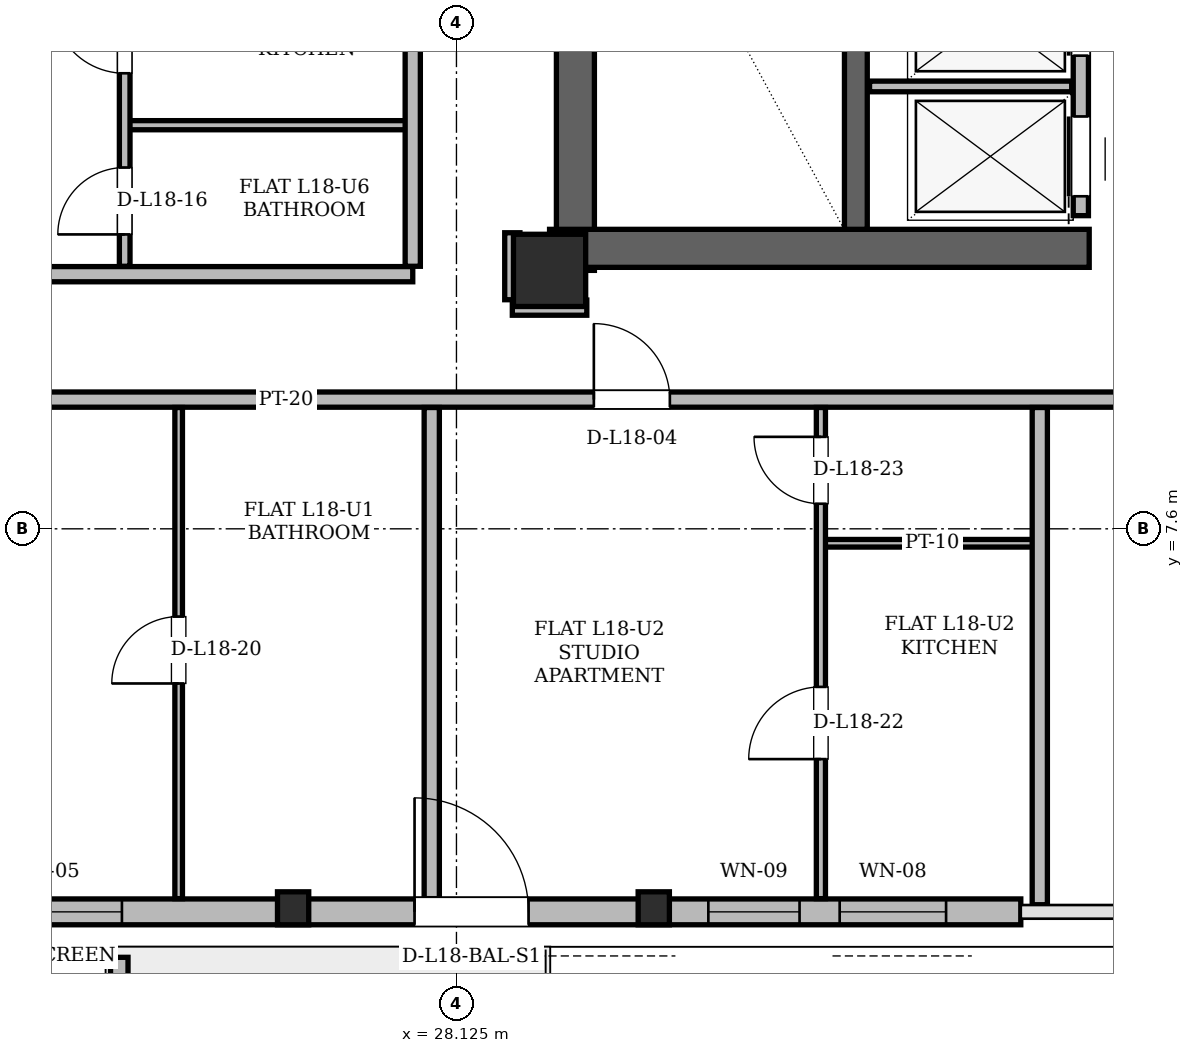
"""IFC4 building model, lengths in metres.
Left out: names, types, materials, properties, quantities, classifications, styles, units other than length and angle.
Written with IfcOpenShell. Run it as: python <this file> out.ifc"""

import sys

from ifc_helpers import new_model, si_unit, direction, frame, frame_2d, origin, origin_2d, place, context, subcontext, project, spatial, polyline, rectangle, hollow_rectangle, i_section, outline, extrude, element, fill, save


model = new_model("IFC4")
c1 = context("Model", 3, precision=1e-05, world=origin(), true_north=direction((0.0, 1.0)))
c2 = subcontext(c1, "Body", "Model", "MODEL_VIEW")
j1 = project(units=[si_unit("LENGTHUNIT", "METRE"), si_unit("PLANEANGLEUNIT", "RADIAN")], contexts=[c1])
p1 = place(None, origin())
s1 = spatial("IfcSite", under=j1, at=p1, CompositionType="ELEMENT")
p2 = place(p1, origin())
s2 = spatial("IfcBuilding", under=s1, at=p2, CompositionType="ELEMENT")
p3 = place(p2, frame((0.0, 0.0, 70.5)))
s3 = spatial("IfcBuildingStorey", under=s2, at=p3, CompositionType="ELEMENT", Elevation=70.5)
p4 = place(p3, frame((29.35, 11.0, 0.0), z_axis=(0.0, 0.0, 1.0), x_axis=(1.0, 0.0, 0.0)))
e1 = element("IfcColumn", 1, at=p4, inside=s3, PredefinedType="COLUMN", context=c2, shape_type="SweptSolid", body=[
    extrude(hollow_rectangle(XDim=0.95, YDim=0.95, WallThickness=0.08, at=origin_2d()), origin(), (0.0, 0.0, 1.0), 3.6),
])
p5 = place(p3, frame((25.99, 2.561, 0.004), z_axis=(-0.008155220537, 0.026096705717, 0.999626157285), x_axis=(-0.954479978035, -0.298274993136, 0.0)))
e2 = element("IfcColumn", 2, at=p5, inside=s3, PredefinedType="COLUMN", context=c2, shape_type="SweptSolid", body=[
    extrude(i_section(OverallWidth=0.411, OverallDepth=0.434, WebThickness=0.036, FlangeThickness=0.057, at=origin_2d()), origin(), (0.0, 0.0, 1.0), 3.593),
])
p6 = place(p3, frame((30.73, 2.561, 0.004), z_axis=(-0.004825276439, 0.026097269755, 0.999647762574), x_axis=(-0.983332910059, -0.181814157849, 0.0)))
e3 = element("IfcColumn", 3, at=p6, inside=s3, PredefinedType="COLUMN", context=c2, shape_type="SweptSolid", body=[
    extrude(i_section(OverallWidth=0.411, OverallDepth=0.434, WebThickness=0.036, FlangeThickness=0.057, at=origin_2d()), origin(), (0.0, 0.0, 1.0), 3.592),
])
p7 = place(p3, frame((29.69, 11.0, 0.0), z_axis=(0.0, 0.0, 1.0), x_axis=(0.0, 1.0, 0.0)))
e4 = element("IfcWall", 4, at=p7, inside=s3, PredefinedType="SHEAR", context=c2, shape_type="SweptSolid", body=[
    extrude(rectangle(XDim=13.3, YDim=0.5, at=frame_2d((6.65, 0.0))), origin(), (0.0, 0.0, 1.0), 3.36),
])
p8 = place(p3, frame((29.35, 11.29, 0.0), z_axis=(0.0, 0.0, 1.0), x_axis=(1.0, 0.0, 0.0)))
e5 = element("IfcWall", 5, at=p8, inside=s3, PredefinedType="SHEAR", context=c2, shape_type="SweptSolid", body=[
    extrude(rectangle(XDim=7.1, YDim=0.5, at=frame_2d((3.55, 0.0))), origin(), (0.0, 0.0, 1.0), 3.36),
])
p9 = place(p3, frame((33.38, 11.54, 0.0), z_axis=(0.0, 0.0, 1.0), x_axis=(0.0, 1.0, 0.0)))
e6 = element("IfcWall", 6, at=p9, inside=s3, PredefinedType="SHEAR", context=c2, shape_type="SweptSolid", body=[
    extrude(rectangle(XDim=7.62, YDim=0.3, at=frame_2d((3.81, 0.0))), origin(), (0.0, 0.0, 1.0), 3.36),
])
p10 = place(p3, frame((20.574, 2.561, 0.0), z_axis=(0.0, 0.0, 1.0), x_axis=(1.0, 0.0, 0.0)))
e7 = element("IfcWall", 7, at=p10, inside=s3, PredefinedType="SOLIDWALL", context=c2, shape_type="SweptSolid", body=[
    extrude(rectangle(XDim=14.976, YDim=0.34, at=frame_2d((7.488, 0.0))), origin(), (0.0, 0.0, 1.0), 2.494),
])
p11 = place(p10, frame((7.0, 0.0, 0.0)))
e8 = element("IfcOpeningElement", 8, at=p11, cuts=e7, PredefinedType="OPENING", context=c2, shape_type="SweptSolid", body=[
    extrude(rectangle(XDim=1.5, YDim=2.2, at=frame_2d((0.75, 1.1))), frame((0.0, 0.17, 0.0), z_axis=(0.0, -1.0, 0.0), x_axis=(1.0, 0.0, 0.0)), (0.0, 0.0, 1.0), 0.34),
])
p12 = place(p10, frame((1.149, 0.0, 0.85)))
e9 = element("IfcOpeningElement", 9, at=p12, cuts=e7, PredefinedType="OPENING", context=c2, shape_type="SweptSolid", body=[
    extrude(rectangle(XDim=2.0, YDim=1.534, at=frame_2d((1.0, 0.767))), frame((0.0, 0.17, 0.0), z_axis=(0.0, -1.0, 0.0), x_axis=(1.0, 0.0, 0.0)), (0.0, 0.0, 1.0), 0.34),
])
p13 = place(p10, frame((10.865, 0.0, 0.85)))
e10 = element("IfcOpeningElement", 10, at=p13, cuts=e7, PredefinedType="OPENING", context=c2, shape_type="SweptSolid", body=[
    extrude(rectangle(XDim=1.2, YDim=1.48, at=frame_2d((0.6, 0.74))), frame((0.0, 0.17, 0.0), z_axis=(0.0, -1.0, 0.0), x_axis=(1.0, 0.0, 0.0)), (0.0, 0.0, 1.0), 0.34),
])
p14 = place(p10, frame((12.593, 0.0, 0.85)))
e11 = element("IfcOpeningElement", 11, at=p14, cuts=e7, PredefinedType="OPENING", context=c2, shape_type="SweptSolid", body=[
    extrude(rectangle(XDim=1.4, YDim=1.534, at=frame_2d((0.7, 0.767))), frame((0.0, 0.17, 0.0), z_axis=(0.0, -1.0, 0.0), x_axis=(1.0, 0.0, 0.0)), (0.0, 0.0, 1.0), 0.34),
])
p15 = place(p3, frame((23.689, 1.963, 0.0), z_axis=(0.0, 0.0, 1.0), x_axis=(0.0, -1.0, 0.0)))
e12 = element("IfcWall", 12, at=p15, inside=s3, PredefinedType="PARAPET", context=c2, shape_type="SweptSolid", body=[
    extrude(outline(polyline([(0.0, 0.0), (2.042, 0.0), (2.042, 1.1), (0.0, 1.32), (0.0, 0.0)])), frame((0.0, 0.115, 0.0), z_axis=(0.0, -1.0, 0.0), x_axis=(1.0, 0.0, 0.0)), (0.0, 0.0, 1.0), 0.23),
])
p16 = place(p3, frame((36.34, 11.72, 0.0), z_axis=(0.0, 0.0, 1.0), x_axis=(0.0, 1.0, 0.0)))
e13 = element("IfcWall", 13, at=p16, inside=s3, PredefinedType="PARTITIONING", context=c2, shape_type="SweptSolid", body=[
    extrude(rectangle(XDim=7.6, YDim=0.2, at=frame_2d((3.8, 0.0))), origin(), (0.0, 0.0, 1.0), 3.36),
])
p17 = place(p16, frame((0.255, 0.0, 0.0)))
e14 = element("IfcOpeningElement", 14, at=p17, cuts=e13, PredefinedType="OPENING", context=c2, shape_type="SweptSolid", body=[
    extrude(rectangle(XDim=1.05, YDim=2.15, at=frame_2d((0.525, 1.075))), frame((0.0, 0.1, 0.0), z_axis=(0.0, -1.0, 0.0), x_axis=(1.0, 0.0, 0.0)), (0.0, 0.0, 1.0), 0.2),
])
p18 = place(p16, frame((2.105, 0.0, 0.0)))
e15 = element("IfcOpeningElement", 15, at=p18, cuts=e13, PredefinedType="OPENING", context=c2, shape_type="SweptSolid", body=[
    extrude(rectangle(XDim=1.05, YDim=2.15, at=frame_2d((0.525, 1.075))), frame((0.0, 0.1, 0.0), z_axis=(0.0, -1.0, 0.0), x_axis=(1.0, 0.0, 0.0)), (0.0, 0.0, 1.0), 0.2),
])
p19 = place(p16, frame((3.955, 0.0, 0.0)))
e16 = element("IfcOpeningElement", 16, at=p19, cuts=e13, PredefinedType="OPENING", context=c2, shape_type="SweptSolid", body=[
    extrude(rectangle(XDim=1.05, YDim=2.15, at=frame_2d((0.525, 1.075))), frame((0.0, 0.1, 0.0), z_axis=(0.0, -1.0, 0.0), x_axis=(1.0, 0.0, 0.0)), (0.0, 0.0, 1.0), 0.2),
])
p20 = place(p3, frame((33.56, 13.42, 0.0), z_axis=(0.0, 0.0, 1.0), x_axis=(1.0, 0.0, 0.0)))
e17 = element("IfcWall", 17, at=p20, inside=s3, PredefinedType="PARTITIONING", context=c2, shape_type="SweptSolid", body=[
    extrude(rectangle(XDim=2.66, YDim=0.14, at=frame_2d((1.33, 0.0))), origin(), (0.0, 0.0, 1.0), 3.36),
])
p21 = place(p3, frame((32.92, 7.41, 0.0), z_axis=(0.0, 0.0, 1.0), x_axis=(1.0, 0.0, 0.0)))
e18 = element("IfcWall", 18, at=p21, inside=s3, PredefinedType="PARTITIONING", context=c2, shape_type="SweptSolid", body=[
    extrude(rectangle(XDim=2.93, YDim=0.1, at=frame_2d((1.465, 0.0))), origin(), (0.0, 0.0, 1.0), 3.36),
])
p22 = place(p3, frame((19.2, 9.3, 0.0), z_axis=(0.0, 0.0, 1.0), x_axis=(1.0, 0.0, 0.0)))
e19 = element("IfcWall", 19, at=p22, inside=s3, PredefinedType="PARTITIONING", context=c2, shape_type="SweptSolid", body=[
    extrude(rectangle(XDim=36.6, YDim=0.2, at=frame_2d((18.3, 0.0))), origin(), (0.0, 0.0, 1.0), 2.738),
])
p23 = place(p22, frame((1.633, 0.0, 0.0)))
e20 = element("IfcOpeningElement", 20, at=p23, cuts=e19, PredefinedType="OPENING", context=c2, shape_type="SweptSolid", body=[
    extrude(rectangle(XDim=1.0, YDim=2.18, at=frame_2d((0.5, 1.09))), frame((0.0, 0.1, 0.0), z_axis=(0.0, -1.0, 0.0), x_axis=(1.0, 0.0, 0.0)), (0.0, 0.0, 1.0), 0.2),
])
p24 = place(p22, frame((10.733, 0.0, 0.0)))
e21 = element("IfcOpeningElement", 21, at=p24, cuts=e19, PredefinedType="OPENING", context=c2, shape_type="SweptSolid", body=[
    extrude(rectangle(XDim=1.0, YDim=2.18, at=frame_2d((0.5, 1.09))), frame((0.0, 0.1, 0.0), z_axis=(0.0, -1.0, 0.0), x_axis=(1.0, 0.0, 0.0)), (0.0, 0.0, 1.0), 0.2),
])
p25 = place(p22, frame((19.314, 0.0, 0.0)))
e22 = element("IfcOpeningElement", 22, at=p25, cuts=e19, PredefinedType="OPENING", context=c2, shape_type="SweptSolid", body=[
    extrude(rectangle(XDim=1.0, YDim=2.18, at=frame_2d((0.5, 1.09))), frame((0.0, 0.1, 0.0), z_axis=(0.0, -1.0, 0.0), x_axis=(1.0, 0.0, 0.0)), (0.0, 0.0, 1.0), 0.2),
])
p26 = place(p22, frame((28.985, 0.0, 0.0)))
e23 = element("IfcOpeningElement", 23, at=p26, cuts=e19, PredefinedType="OPENING", context=c2, shape_type="SweptSolid", body=[
    extrude(rectangle(XDim=1.0, YDim=2.18, at=frame_2d((0.5, 1.09))), frame((0.0, 0.1, 0.0), z_axis=(0.0, -1.0, 0.0), x_axis=(1.0, 0.0, 0.0)), (0.0, 0.0, 1.0), 0.2),
])
p27 = place(p22, frame((33.856, 0.0, 0.0)))
e24 = element("IfcOpeningElement", 24, at=p27, cuts=e19, PredefinedType="OPENING", context=c2, shape_type="SweptSolid", body=[
    extrude(rectangle(XDim=1.0, YDim=2.18, at=frame_2d((0.5, 1.09))), frame((0.0, 0.1, 0.0), z_axis=(0.0, -1.0, 0.0), x_axis=(1.0, 0.0, 0.0)), (0.0, 0.0, 1.0), 0.2),
])
p28 = place(p3, frame((28.86, 10.51, 0.0), z_axis=(0.0, 0.0, 1.0), x_axis=(1.0, 0.0, 0.0)))
e25 = element("IfcWall", 25, at=p28, inside=s3, PredefinedType="PARTITIONING", context=c2, shape_type="SweptSolid", body=[
    extrude(rectangle(XDim=0.98, YDim=0.2, at=frame_2d((0.49, 0.0))), origin(), (0.0, 0.0, 1.0), 2.738),
])
p29 = place(p3, frame((15.932, 10.95, 0.0), z_axis=(0.0, 0.0, 1.0), x_axis=(1.0, 0.0, 0.0)))
e26 = element("IfcWall", 26, at=p29, inside=s3, PredefinedType="PARTITIONING", context=c2, shape_type="SweptSolid", body=[
    extrude(rectangle(XDim=11.618, YDim=0.2, at=frame_2d((5.809, 0.0))), origin(), (0.0, 0.0, 1.0), 3.36),
])
p30 = place(p29, frame((4.854, 0.0, 0.0)))
e27 = element("IfcOpeningElement", 27, at=p30, cuts=e26, PredefinedType="OPENING", context=c2, shape_type="SweptSolid", body=[
    extrude(rectangle(XDim=1.0, YDim=2.18, at=frame_2d((0.5, 1.09))), frame((0.0, 0.1, 0.0), z_axis=(0.0, -1.0, 0.0), x_axis=(1.0, 0.0, 0.0)), (0.0, 0.0, 1.0), 0.2),
])
p31 = place(p3, frame((23.762, 12.91, 0.0), z_axis=(0.0, 0.0, 1.0), x_axis=(1.0, 0.0, 0.0)))
e28 = element("IfcWall", 28, at=p31, inside=s3, PredefinedType="PARTITIONING", context=c2, shape_type="SweptSolid", body=[
    extrude(rectangle(XDim=3.838, YDim=0.12, at=frame_2d((1.919, 0.0))), origin(), (0.0, 0.0, 1.0), 3.36),
])
p32 = place(p3, frame((23.76, 11.054, 0.0), z_axis=(0.0, 0.0, 1.0), x_axis=(0.0, 1.0, 0.0)))
e29 = element("IfcWall", 29, at=p32, inside=s3, PredefinedType="PARTITIONING", context=c2, shape_type="SweptSolid", body=[
    extrude(rectangle(XDim=4.042, YDim=0.14, at=frame_2d((2.021, 0.0))), origin(), (0.0, 0.0, 1.0), 2.738),
])
p33 = place(p32, frame((0.419, 0.0, 0.0)))
e30 = element("IfcOpeningElement", 30, at=p33, cuts=e29, PredefinedType="OPENING", context=c2, shape_type="SweptSolid", body=[
    extrude(rectangle(XDim=0.88, YDim=2.08, at=frame_2d((0.44, 1.04))), frame((0.0, 0.07, 0.0), z_axis=(0.0, -1.0, 0.0), x_axis=(1.0, 0.0, 0.0)), (0.0, 0.0, 1.0), 0.14),
])
p34 = place(p32, frame((2.539, 0.0, 0.0)))
e31 = element("IfcOpeningElement", 31, at=p34, cuts=e29, PredefinedType="OPENING", context=c2, shape_type="SweptSolid", body=[
    extrude(rectangle(XDim=0.95, YDim=2.1, at=frame_2d((0.475, 1.05))), frame((0.0, 0.07, 0.0), z_axis=(0.0, -1.0, 0.0), x_axis=(1.0, 0.0, 0.0)), (0.0, 0.0, 1.0), 0.14),
])
p35 = place(p3, frame((24.47, 2.735, 0.0), z_axis=(0.0, 0.0, 1.0), x_axis=(0.0, 1.0, 0.0)))
e32 = element("IfcWall", 32, at=p35, inside=s3, PredefinedType="PARTITIONING", context=c2, shape_type="SweptSolid", body=[
    extrude(rectangle(XDim=6.461, YDim=0.1, at=frame_2d((3.231, 0.0))), origin(), (0.0, 0.0, 1.0), 2.738),
])
p36 = place(p35, frame((2.831, 0.0, 0.0)))
e33 = element("IfcOpeningElement", 33, at=p36, cuts=e32, PredefinedType="OPENING", context=c2, shape_type="SweptSolid", body=[
    extrude(rectangle(XDim=0.88, YDim=2.08, at=frame_2d((0.44, 1.04))), frame((0.0, 0.05, 0.0), z_axis=(0.0, -1.0, 0.0), x_axis=(1.0, 0.0, 0.0)), (0.0, 0.0, 1.0), 0.1),
])
p37 = place(p3, frame((27.55, 11.054, 0.0), z_axis=(0.0, 0.0, 1.0), x_axis=(0.0, 1.0, 0.0)))
e34 = element("IfcWall", 34, at=p37, inside=s3, PredefinedType="PARTITIONING", context=c2, shape_type="SweptSolid", body=[
    extrude(rectangle(XDim=14.812, YDim=0.2, at=frame_2d((7.406, 0.0))), origin(), (0.0, 0.0, 1.0), 2.738),
])
p38 = place(p37, frame((6.031, 0.0, 0.0)))
e35 = element("IfcOpeningElement", 35, at=p38, cuts=e34, PredefinedType="OPENING", context=c2, shape_type="SweptSolid", body=[
    extrude(rectangle(XDim=1.0, YDim=2.18, at=frame_2d((0.5, 1.09))), frame((0.0, 0.1, 0.0), z_axis=(0.0, -1.0, 0.0), x_axis=(1.0, 0.0, 0.0)), (0.0, 0.0, 1.0), 0.2),
])
p39 = place(p3, frame((27.8, 2.735, 0.0), z_axis=(0.0, 0.0, 1.0), x_axis=(0.0, 1.0, 0.0)))
e36 = element("IfcWall", 36, at=p39, inside=s3, PredefinedType="PARTITIONING", context=c2, shape_type="SweptSolid", body=[
    extrude(rectangle(XDim=6.461, YDim=0.2, at=frame_2d((3.231, 0.0))), origin(), (0.0, 0.0, 1.0), 2.946),
])
p40 = place(p3, frame((28.86, 10.614, 0.0), z_axis=(0.0, 0.0, 1.0), x_axis=(0.0, 1.0, 0.0)))
e37 = element("IfcWall", 37, at=p40, inside=s3, PredefinedType="PARTITIONING", context=c2, shape_type="SweptSolid", body=[
    extrude(rectangle(XDim=0.881, YDim=0.2, at=frame_2d((0.44, 0.0))), origin(), (0.0, 0.0, 1.0), 2.738),
])
p41 = place(p3, frame((32.92, 2.735, 0.0), z_axis=(0.0, 0.0, 1.0), x_axis=(0.0, 1.0, 0.0)))
e38 = element("IfcWall", 38, at=p41, inside=s3, PredefinedType="PARTITIONING", context=c2, shape_type="SweptSolid", body=[
    extrude(rectangle(XDim=6.461, YDim=0.12, at=frame_2d((3.231, 0.0))), origin(), (0.0, 0.0, 1.0), 2.946),
])
p42 = place(p41, frame((1.836, 0.0, 0.0)))
e39 = element("IfcOpeningElement", 39, at=p42, cuts=e38, PredefinedType="OPENING", context=c2, shape_type="SweptSolid", body=[
    extrude(rectangle(XDim=0.95, YDim=2.1, at=frame_2d((0.475, 1.05))), frame((0.0, 0.06, 0.0), z_axis=(0.0, -1.0, 0.0), x_axis=(1.0, 0.0, 0.0)), (0.0, 0.0, 1.0), 0.12),
])
p43 = place(p41, frame((5.195, 0.0, 0.0)))
e40 = element("IfcOpeningElement", 40, at=p43, cuts=e38, PredefinedType="OPENING", context=c2, shape_type="SweptSolid", body=[
    extrude(rectangle(XDim=0.88, YDim=2.08, at=frame_2d((0.44, 1.04))), frame((0.0, 0.06, 0.0), z_axis=(0.0, -1.0, 0.0), x_axis=(1.0, 0.0, 0.0)), (0.0, 0.0, 1.0), 0.12),
])
p44 = place(p3, frame((35.8, 2.655, 0.0), z_axis=(0.0, 0.0, 1.0), x_axis=(0.0, 1.0, 0.0)))
e41 = element("IfcWall", 41, at=p44, inside=s3, PredefinedType="PARTITIONING", context=c2, shape_type="SweptSolid", body=[
    extrude(rectangle(XDim=6.542, YDim=0.2, at=frame_2d((3.271, 0.0))), origin(), (0.0, 0.0, 1.0), 2.494),
])
p45 = place(p11, origin())
e42 = element("IfcDoor", 42, at=p45, inside=s3, OperationType="SINGLE_SWING_LEFT", PredefinedType="DOOR", context=c2, shape_type="SweptSolid", body=[
    extrude(rectangle(XDim=1.5, YDim=2.2, at=frame_2d((0.75, 1.1))), frame((0.0, 0.025, 0.0), z_axis=(0.0, -1.0, 0.0), x_axis=(1.0, 0.0, 0.0)), (0.0, 0.0, 1.0), 0.05),
])
fill(e8, e42)
p46 = place(p12, origin())
e43 = element("IfcWindow", 43, at=p46, inside=s3, PartitioningType="SINGLE_PANEL", PredefinedType="WINDOW", context=c2, shape_type="SweptSolid", body=[
    extrude(rectangle(XDim=2.0, YDim=1.534, at=frame_2d((1.0, 0.767))), frame((0.0, 0.03, 0.0), z_axis=(0.0, -1.0, 0.0), x_axis=(1.0, 0.0, 0.0)), (0.0, 0.0, 1.0), 0.06),
])
fill(e9, e43)
p47 = place(p13, origin())
e44 = element("IfcWindow", 44, at=p47, inside=s3, PartitioningType="SINGLE_PANEL", PredefinedType="WINDOW", context=c2, shape_type="SweptSolid", body=[
    extrude(rectangle(XDim=1.2, YDim=1.48, at=frame_2d((0.6, 0.74))), frame((0.0, 0.03, 0.0), z_axis=(0.0, -1.0, 0.0), x_axis=(1.0, 0.0, 0.0)), (0.0, 0.0, 1.0), 0.06),
])
fill(e10, e44)
p48 = place(p14, origin())
e45 = element("IfcWindow", 45, at=p48, inside=s3, PartitioningType="SINGLE_PANEL", PredefinedType="WINDOW", context=c2, shape_type="SweptSolid", body=[
    extrude(rectangle(XDim=1.4, YDim=1.534, at=frame_2d((0.7, 0.767))), frame((0.0, 0.03, 0.0), z_axis=(0.0, -1.0, 0.0), x_axis=(1.0, 0.0, 0.0)), (0.0, 0.0, 1.0), 0.06),
])
fill(e11, e45)
p49 = place(p17, origin())
e46 = element("IfcDoor", 46, at=p49, inside=s3, OperationType="SLIDING_TO_LEFT", PredefinedType="DOOR", context=c2, shape_type="SweptSolid", body=[
    extrude(rectangle(XDim=1.05, YDim=2.15, at=frame_2d((0.525, 1.075))), frame((0.0, 0.025, 0.0), z_axis=(0.0, -1.0, 0.0), x_axis=(1.0, 0.0, 0.0)), (0.0, 0.0, 1.0), 0.05),
])
fill(e14, e46)
p50 = place(p18, origin())
e47 = element("IfcDoor", 47, at=p50, inside=s3, OperationType="SLIDING_TO_RIGHT", PredefinedType="DOOR", context=c2, shape_type="SweptSolid", body=[
    extrude(rectangle(XDim=1.05, YDim=2.15, at=frame_2d((0.525, 1.075))), frame((0.0, 0.025, 0.0), z_axis=(0.0, -1.0, 0.0), x_axis=(1.0, 0.0, 0.0)), (0.0, 0.0, 1.0), 0.05),
])
fill(e15, e47)
p51 = place(p24, origin())
e48 = element("IfcDoor", 48, at=p51, inside=s3, OperationType="SINGLE_SWING_LEFT", PredefinedType="DOOR", context=c2, shape_type="SweptSolid", body=[
    extrude(rectangle(XDim=1.0, YDim=2.18, at=frame_2d((0.5, 1.09))), frame((0.0, 0.025, 0.0), z_axis=(0.0, -1.0, 0.0), x_axis=(1.0, 0.0, 0.0)), (0.0, 0.0, 1.0), 0.05),
])
fill(e21, e48)
p52 = place(p33, origin())
e49 = element("IfcDoor", 49, at=p52, inside=s3, OperationType="SINGLE_SWING_LEFT", PredefinedType="DOOR", context=c2, shape_type="SweptSolid", body=[
    extrude(rectangle(XDim=0.88, YDim=2.08, at=frame_2d((0.44, 1.04))), frame((0.0, 0.025, 0.0), z_axis=(0.0, -1.0, 0.0), x_axis=(1.0, 0.0, 0.0)), (0.0, 0.0, 1.0), 0.05),
])
fill(e30, e49)
p53 = place(p34, origin())
e50 = element("IfcDoor", 50, at=p53, inside=s3, OperationType="SINGLE_SWING_RIGHT", PredefinedType="DOOR", context=c2, shape_type="SweptSolid", body=[
    extrude(rectangle(XDim=0.95, YDim=2.1, at=frame_2d((0.475, 1.05))), frame((0.0, 0.025, 0.0), z_axis=(0.0, -1.0, 0.0), x_axis=(1.0, 0.0, 0.0)), (0.0, 0.0, 1.0), 0.05),
])
fill(e31, e50)
p54 = place(p36, origin())
e51 = element("IfcDoor", 51, at=p54, inside=s3, OperationType="SINGLE_SWING_LEFT", PredefinedType="DOOR", context=c2, shape_type="SweptSolid", body=[
    extrude(rectangle(XDim=0.88, YDim=2.08, at=frame_2d((0.44, 1.04))), frame((0.0, 0.025, 0.0), z_axis=(0.0, -1.0, 0.0), x_axis=(1.0, 0.0, 0.0)), (0.0, 0.0, 1.0), 0.05),
])
fill(e33, e51)
p55 = place(p42, origin())
e52 = element("IfcDoor", 52, at=p55, inside=s3, OperationType="SINGLE_SWING_LEFT", PredefinedType="DOOR", context=c2, shape_type="SweptSolid", body=[
    extrude(rectangle(XDim=0.95, YDim=2.1, at=frame_2d((0.475, 1.05))), frame((0.0, 0.025, 0.0), z_axis=(0.0, -1.0, 0.0), x_axis=(1.0, 0.0, 0.0)), (0.0, 0.0, 1.0), 0.05),
])
fill(e39, e52)
p56 = place(p43, origin())
e53 = element("IfcDoor", 53, at=p56, inside=s3, OperationType="SINGLE_SWING_RIGHT", PredefinedType="DOOR", context=c2, shape_type="SweptSolid", body=[
    extrude(rectangle(XDim=0.88, YDim=2.08, at=frame_2d((0.44, 1.04))), frame((0.0, 0.025, 0.0), z_axis=(0.0, -1.0, 0.0), x_axis=(1.0, 0.0, 0.0)), (0.0, 0.0, 1.0), 0.05),
])
fill(e40, e53)
save(model, sys.argv[1])
